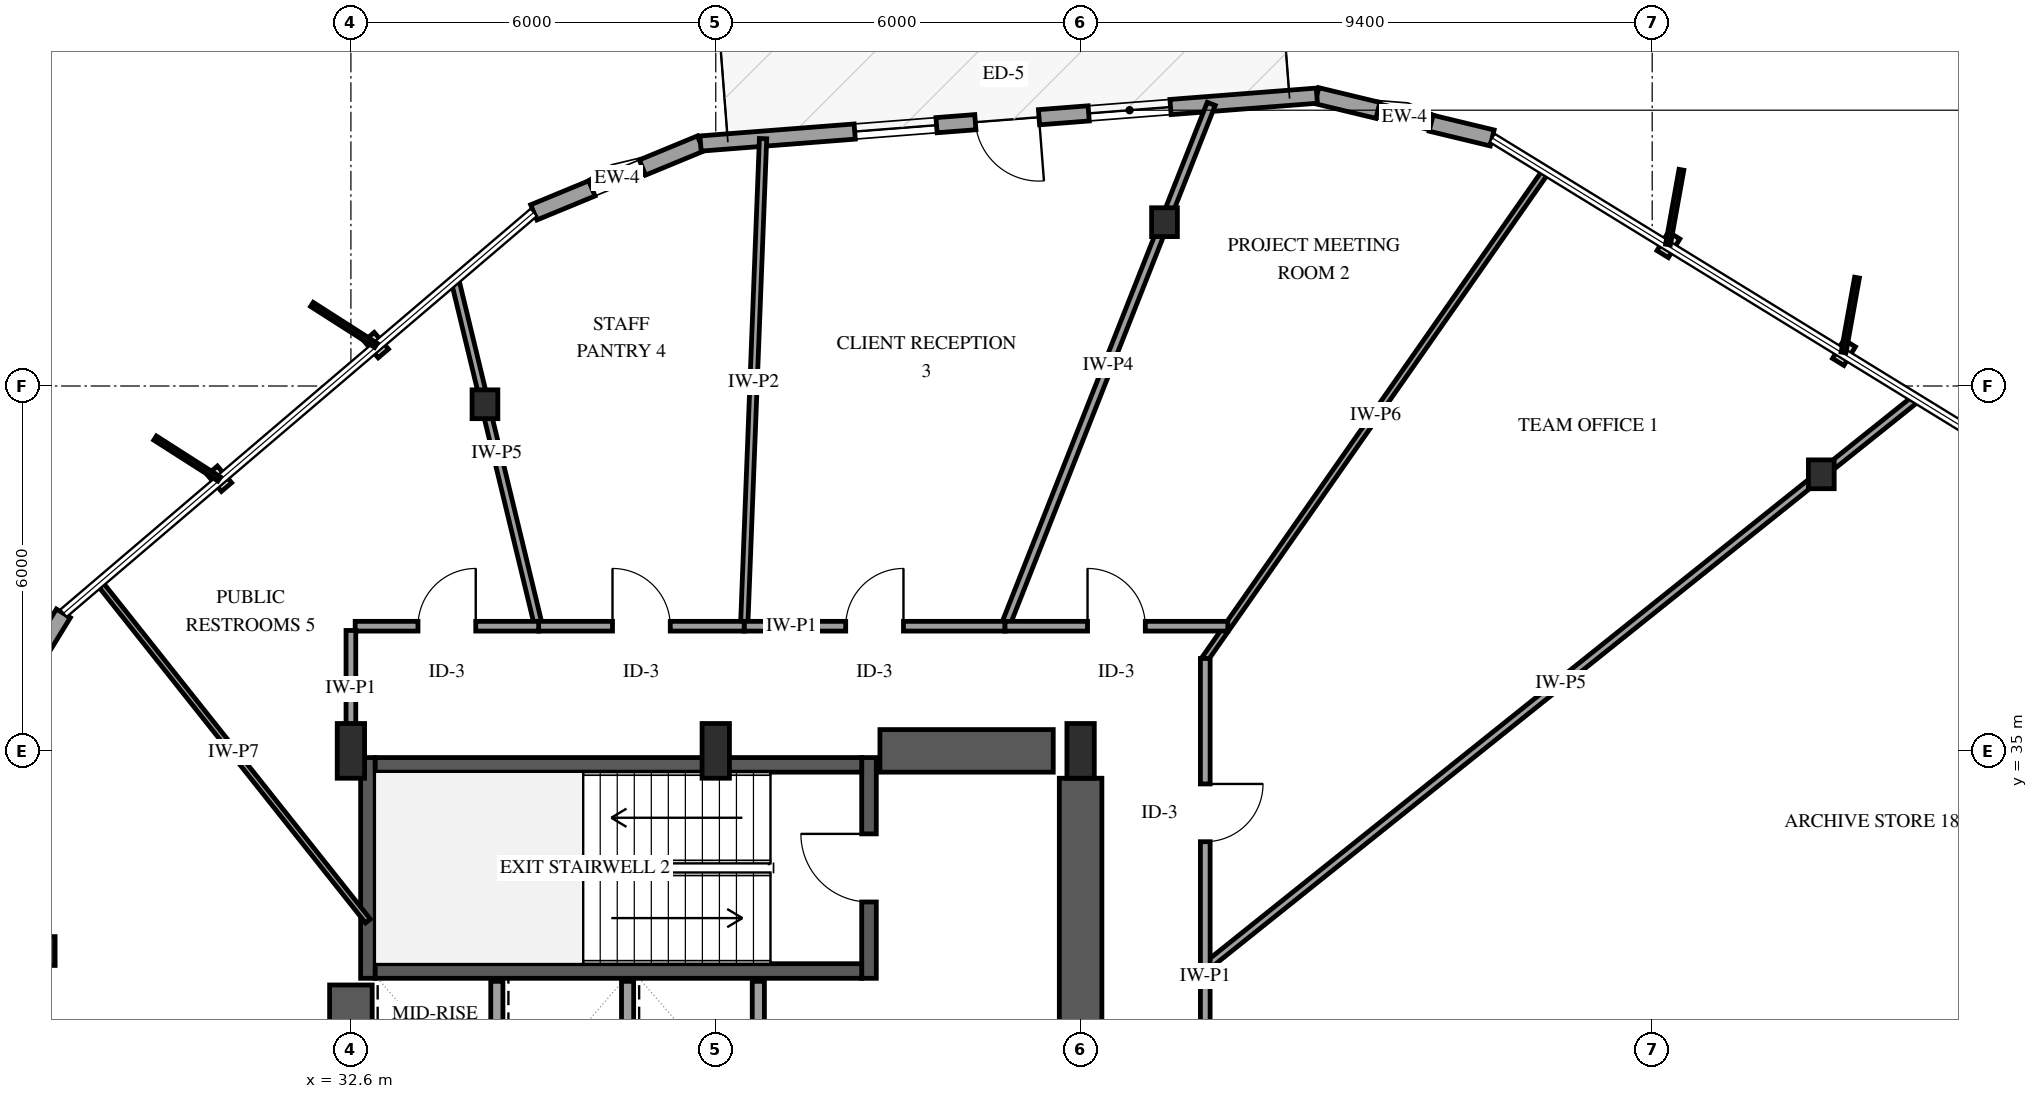
"""IFC4 building model, lengths in metres.
Left out: names, types, materials, properties, quantities, classifications, styles, units other than length and angle.
Written with IfcOpenShell. Run it as: python <this file> out.ifc"""

import sys

from ifc_helpers import new_model, si_unit, direction, frame, frame_2d, origin, origin_2d, place, context, subcontext, project, spatial, rectangle, i_section, extrude, element, fill, save


model = new_model("IFC4")
c1 = context("Model", 3, precision=1e-05, world=origin(), true_north=direction((0.0, 1.0)))
c2 = subcontext(c1, "Body", "Model", "MODEL_VIEW")
j1 = project(units=[si_unit("LENGTHUNIT", "METRE"), si_unit("PLANEANGLEUNIT", "RADIAN")], contexts=[c1])
p1 = place(None, origin())
s1 = spatial("IfcSite", under=j1, at=p1, CompositionType="ELEMENT")
p2 = place(p1, origin())
s2 = spatial("IfcBuilding", under=s1, at=p2, CompositionType="ELEMENT")
p3 = place(p2, frame((0.0, 0.0, 50.6)))
s3 = spatial("IfcBuildingStorey", under=s2, at=p3, CompositionType="ELEMENT", Elevation=50.6)
p4 = place(p3, frame((32.88, 31.26, 0.0), z_axis=(0.0, 0.0, 1.0), x_axis=(0.0, 1.0, 0.0)))
e1 = element("IfcWall", 1, at=p4, inside=s3, PredefinedType="SHEAR", context=c2, shape_type="SweptSolid", body=[
    extrude(rectangle(XDim=3.63, YDim=0.24, at=frame_2d((1.815, 0.0))), origin(), (0.0, 0.0, 1.0), 4.0),
])
p5 = place(p3, frame((41.12, 31.26, 0.0), z_axis=(0.0, 0.0, 1.0), x_axis=(0.0, 1.0, 0.0)))
e2 = element("IfcWall", 2, at=p5, inside=s3, PredefinedType="SHEAR", context=c2, shape_type="SweptSolid", body=[
    extrude(rectangle(XDim=3.63, YDim=0.24, at=frame_2d((1.815, 0.0))), origin(), (0.0, 0.0, 1.0), 4.0),
])
p6 = place(p5, frame((1.255, 0.0, 0.0)))
e3 = element("IfcOpeningElement", 3, at=p6, cuts=e2, PredefinedType="OPENING", context=c2, shape_type="SweptSolid", body=[
    extrude(rectangle(XDim=1.12, YDim=2.15, at=frame_2d((0.56, 1.075))), frame((0.0, 0.13, 0.0), z_axis=(0.0, -1.0, 0.0), x_axis=(1.0, 0.0, 0.0)), (0.0, 0.0, 1.0), 0.26),
])
for number, where, z_axis, x_axis in (
    (4, (33.0, 31.38, 0.0), (0.0, 0.0, 1.0), (1.0, 0.0, 0.0)),
    (5, (33.0, 34.77, 0.0), (0.0, 0.0, 1.0), (1.0, 0.0, 0.0)),
):
    element("IfcWall", number, at=place(p3, frame(where, z_axis=z_axis, x_axis=x_axis)), inside=s3, PredefinedType="SHEAR", context=c2, shape_type="SweptSolid", body=[
        extrude(rectangle(XDim=8.0, YDim=0.24, at=frame_2d((4.0, 0.0))), origin(), (0.0, 0.0, 1.0), 4.0),
    ])
p7 = place(p3, frame((32.6, 18.85, 0.0), z_axis=(0.0, 0.0, 1.0), x_axis=(0.0, 1.0, 0.0)))
e6 = element("IfcWall", 6, at=p7, inside=s3, PredefinedType="SHEAR", context=c2, shape_type="SweptSolid", body=[
    extrude(rectangle(XDim=12.3, YDim=0.7, at=frame_2d((6.15, 0.0))), origin(), (0.0, 0.0, 1.0), 4.0),
])
p8 = place(p3, frame((41.3, 35.0, 0.0), z_axis=(0.0, 0.0, 1.0), x_axis=(1.0, 0.0, 0.0)))
e7 = element("IfcWall", 7, at=p8, inside=s3, PredefinedType="SHEAR", context=c2, shape_type="SweptSolid", body=[
    extrude(rectangle(XDim=2.85, YDim=0.7, at=frame_2d((1.425, 0.0))), origin(), (0.0, 0.0, 1.0), 4.0),
])
p9 = place(p3, frame((44.6, 29.8, 0.0), z_axis=(0.0, 0.0, 1.0), x_axis=(0.0, 1.0, 0.0)))
e8 = element("IfcWall", 8, at=p9, inside=s3, PredefinedType="SHEAR", context=c2, shape_type="SweptSolid", body=[
    extrude(rectangle(XDim=4.75, YDim=0.7, at=frame_2d((2.375, 0.0))), origin(), (0.0, 0.0, 1.0), 4.0),
])
for number, where, z_axis, x_axis in (
    (9, (32.6, 35.0, 0.0), (0.0, 0.0, 1.0), (1.0, 0.0, 0.0)),
    (10, (38.6, 35.0, 0.0), (0.0, 0.0, 1.0), (1.0, 0.0, 0.0)),
    (11, (44.6, 35.0, 0.0), (0.0, 0.0, 1.0), (1.0, 0.0, 0.0)),
):
    element("IfcColumn", number, at=place(p3, frame(where, z_axis=z_axis, x_axis=x_axis)), inside=s3, PredefinedType="PILASTER", context=c2, shape_type="SweptSolid", body=[
        extrude(rectangle(XDim=0.45, YDim=0.9, at=origin_2d()), origin(), (0.0, 0.0, 1.0), 4.0),
    ])
for number, where, z_axis, x_axis in (
    (12, (56.781, 39.548, 0.0), (0.0, 0.0, 1.0), (1.0, 0.0, 0.0)),
    (13, (45.98, 43.694, 0.0), (0.0, 0.0, 1.0), (1.0, 0.0, 0.0)),
    (14, (34.804, 40.7, 0.0), (0.0, 0.0, 1.0), (1.0, 0.0, 0.0)),
    (15, (27.523, 31.708, 0.0), (0.0, 0.0, 1.0), (1.0, 0.0, 0.0)),
):
    element("IfcColumn", number, at=place(p3, frame(where, z_axis=z_axis, x_axis=x_axis)), inside=s3, PredefinedType="COLUMN", context=c2, shape_type="SweptSolid", body=[
        extrude(i_section(OverallWidth=0.424, OverallDepth=0.474, WebThickness=0.048, FlangeThickness=0.077, FilletRadius=0.038, at=origin_2d()), origin(), (0.0, 0.0, 1.0), 4.0),
    ])
p10 = place(p3, frame((51.369, 45.079, 0.0), z_axis=(0.0, 0.0, 1.0), x_axis=(-0.972104212083, 0.234549356962, 0.0)))
e16 = element("IfcWall", 16, at=p10, inside=s3, PredefinedType="SOLIDWALL", context=c2, shape_type="SweptSolid", body=[
    extrude(rectangle(XDim=2.967, YDim=0.27, at=frame_2d((1.483, 0.0))), origin(), (0.0, 0.0, 1.0), 3.079),
])
p11 = place(p10, frame((1.033, 0.0, 0.75)))
e17 = element("IfcOpeningElement", 17, at=p11, cuts=e16, PredefinedType="OPENING", context=c2, shape_type="SweptSolid", body=[
    extrude(rectangle(XDim=0.9, YDim=1.5, at=frame_2d((0.45, 0.75))), frame((0.0, 0.145, 0.0), z_axis=(0.0, -1.0, 0.0), x_axis=(1.0, 0.0, 0.0)), (0.0, 0.0, 1.0), 0.29),
])
p12 = place(p3, frame((38.35, 44.988, 0.0), z_axis=(0.0, 0.0, 1.0), x_axis=(-0.924287306496, -0.381697491544, 0.0)))
e18 = element("IfcWall", 18, at=p12, inside=s3, PredefinedType="SOLIDWALL", context=c2, shape_type="SweptSolid", body=[
    extrude(rectangle(XDim=2.967, YDim=0.27, at=frame_2d((1.483, 0.0))), origin(), (0.0, 0.0, 1.0), 3.079),
])
p13 = place(p12, frame((1.033, 0.0, 0.75)))
e19 = element("IfcOpeningElement", 19, at=p13, cuts=e18, PredefinedType="OPENING", context=c2, shape_type="SweptSolid", body=[
    extrude(rectangle(XDim=0.9, YDim=1.5, at=frame_2d((0.45, 0.75))), frame((0.0, 0.145, 0.0), z_axis=(0.0, -1.0, 0.0), x_axis=(1.0, 0.0, 0.0)), (0.0, 0.0, 1.0), 0.29),
])
p14 = place(p3, frame((48.485, 45.775, 0.0), z_axis=(0.0, 0.0, 1.0), x_axis=(-0.996997704041, -0.07743111866, 0.0)))
e20 = element("IfcWall", 20, at=p14, inside=s3, PredefinedType="SOLIDWALL", context=c2, shape_type="SweptSolid", body=[
    extrude(rectangle(XDim=10.165, YDim=0.25, at=frame_2d((5.083, 0.0))), origin(), (0.0, 0.0, 1.0), 3.079),
])
p15 = place(p14, frame((4.583, 0.0, 0.0)))
e21 = element("IfcOpeningElement", 21, at=p15, cuts=e20, PredefinedType="OPENING", context=c2, shape_type="SweptSolid", body=[
    extrude(rectangle(XDim=1.05, YDim=2.15, at=frame_2d((0.525, 1.075))), frame((0.0, 0.135, 0.0), z_axis=(0.0, -1.0, 0.0), x_axis=(1.0, 0.0, 0.0)), (0.0, 0.0, 1.0), 0.27),
])
p16 = place(p14, frame((2.413, 0.0, 0.72)))
e22 = element("IfcOpeningElement", 22, at=p16, cuts=e20, PredefinedType="OPENING", context=c2, shape_type="SweptSolid", body=[
    extrude(rectangle(XDim=1.35, YDim=1.65, at=frame_2d((0.675, 0.825))), frame((0.0, 0.135, 0.0), z_axis=(0.0, -1.0, 0.0), x_axis=(1.0, 0.0, 0.0)), (0.0, 0.0, 1.0), 0.27),
])
p17 = place(p14, frame((6.273, 0.0, 0.72)))
e23 = element("IfcOpeningElement", 23, at=p17, cuts=e20, PredefinedType="OPENING", context=c2, shape_type="SweptSolid", body=[
    extrude(rectangle(XDim=1.35, YDim=1.65, at=frame_2d((0.675, 0.825))), frame((0.0, 0.135, 0.0), z_axis=(0.0, -1.0, 0.0), x_axis=(1.0, 0.0, 0.0)), (0.0, 0.0, 1.0), 0.27),
])
p18 = place(p3, frame((27.872, 37.262, 0.0), z_axis=(0.0, 0.0, 1.0), x_axis=(-0.523399327402, -0.852087521371, 0.0)))
e24 = element("IfcWall", 24, at=p18, inside=s3, PredefinedType="SOLIDWALL", context=c2, shape_type="SweptSolid", body=[
    extrude(rectangle(XDim=2.967, YDim=0.27, at=frame_2d((1.483, 0.0))), origin(), (0.0, 0.0, 1.0), 3.079),
])
p19 = place(p18, frame((1.033, 0.0, 0.75)))
e25 = element("IfcOpeningElement", 25, at=p19, cuts=e24, PredefinedType="OPENING", context=c2, shape_type="SweptSolid", body=[
    extrude(rectangle(XDim=0.9, YDim=1.5, at=frame_2d((0.45, 0.75))), frame((0.0, 0.145, 0.0), z_axis=(0.0, -1.0, 0.0), x_axis=(1.0, 0.0, 0.0)), (0.0, 0.0, 1.0), 0.29),
])
for number, where, z_axis, x_axis in (
    (26, (35.0, 29.11, 0.0), (0.0, 0.0, 1.0), (0.0, 1.0, 0.0)),
    (27, (37.15, 29.11, 0.0), (0.0, 0.0, 1.0), (0.0, 1.0, 0.0)),
    (28, (39.3, 29.11, 0.0), (0.0, 0.0, 1.0), (0.0, 1.0, 0.0)),
):
    element("IfcWall", number, at=place(p3, frame(where, z_axis=z_axis, x_axis=x_axis)), inside=s3, PredefinedType="SOLIDWALL", context=c2, shape_type="SweptSolid", body=[
        extrude(rectangle(XDim=2.1, YDim=0.2, at=frame_2d((1.05, 0.0))), origin(), (0.0, 0.0, 1.0), 3.7),
    ])
p20 = place(p3, frame((46.65, 31.442, 0.0), z_axis=(0.0, 0.0, 1.0), x_axis=(0.780833810494, 0.624738793728, 0.0)))
e29 = element("IfcWall", 29, at=p20, inside=s3, PredefinedType="PARTITIONING", context=c2, shape_type="SweptSolid", body=[
    extrude(rectangle(XDim=14.973, YDim=0.13, at=frame_2d((7.486, 0.0))), origin(), (0.0, 0.0, 1.0), 3.7),
])
p21 = place(p3, frame((46.65, 36.519, 0.0), z_axis=(0.0, 0.0, 1.0), x_axis=(0.572860774391, 0.819652690574, 0.0)))
e30 = element("IfcWall", 30, at=p21, inside=s3, PredefinedType="PARTITIONING", context=c2, shape_type="SweptSolid", body=[
    extrude(rectangle(XDim=9.781, YDim=0.11, at=frame_2d((4.89, 0.0))), origin(), (0.0, 0.0, 1.0), 3.7),
])
p22 = place(p3, frame((43.357, 37.05, 0.0), z_axis=(0.0, 0.0, 1.0), x_axis=(0.367202648998, 0.930140964891, 0.0)))
e31 = element("IfcWall", 31, at=p22, inside=s3, PredefinedType="PARTITIONING", context=c2, shape_type="SweptSolid", body=[
    extrude(rectangle(XDim=9.235, YDim=0.14, at=frame_2d((4.618, 0.0))), origin(), (0.0, 0.0, 1.0), 2.995),
])
p23 = place(p3, frame((39.067, 37.05, 0.0), z_axis=(0.0, 0.0, 1.0), x_axis=(0.038762636896, 0.999248446574, 0.0)))
e32 = element("IfcWall", 32, at=p23, inside=s3, PredefinedType="PARTITIONING", context=c2, shape_type="SweptSolid", body=[
    extrude(rectangle(XDim=8.024, YDim=0.12, at=frame_2d((4.012, 0.0))), origin(), (0.0, 0.0, 1.0), 3.7),
])
p24 = place(p3, frame((32.88, 32.202, 0.0), z_axis=(0.0, 0.0, 1.0), x_axis=(-0.621908178435, 0.783090172072, 0.0)))
e33 = element("IfcWall", 33, at=p24, inside=s3, PredefinedType="PARTITIONING", context=c2, shape_type="SweptSolid", body=[
    extrude(rectangle(XDim=7.104, YDim=0.1, at=frame_2d((3.552, 0.0))), origin(), (0.0, 0.0, 1.0), 3.7),
])
p25 = place(p3, frame((35.687, 37.05, 0.0), z_axis=(0.0, 0.0, 1.0), x_axis=(-0.235013634281, 0.971992073888, 0.0)))
e34 = element("IfcWall", 34, at=p25, inside=s3, PredefinedType="PARTITIONING", context=c2, shape_type="SweptSolid", body=[
    extrude(rectangle(XDim=5.863, YDim=0.13, at=frame_2d((2.932, 0.0))), origin(), (0.0, 0.0, 1.0), 2.995),
])
p26 = place(p3, frame((46.65, 36.519, 0.0), z_axis=(0.0, 0.0, 1.0), x_axis=(0.0, -1.0, 0.0)))
e35 = element("IfcWall", 35, at=p26, inside=s3, PredefinedType="PARTITIONING", context=c2, shape_type="SweptSolid", body=[
    extrude(rectangle(XDim=5.077, YDim=0.16, at=frame_2d((2.539, 0.0))), origin(), (0.0, 0.0, 1.0), 3.7),
])
p27 = place(p26, frame((2.063, 0.0, 0.0)))
e36 = element("IfcOpeningElement", 36, at=p27, cuts=e35, PredefinedType="OPENING", context=c2, shape_type="SweptSolid", body=[
    extrude(rectangle(XDim=0.95, YDim=2.15, at=frame_2d((0.475, 1.075))), frame((0.0, 0.09, 0.0), z_axis=(0.0, -1.0, 0.0), x_axis=(1.0, 0.0, 0.0)), (0.0, 0.0, 1.0), 0.18),
])
p28 = place(p3, frame((46.65, 31.442, 0.0), z_axis=(0.0, 0.0, 1.0), x_axis=(0.0, -1.0, 0.0)))
e37 = element("IfcWall", 37, at=p28, inside=s3, PredefinedType="PARTITIONING", context=c2, shape_type="SweptSolid", body=[
    extrude(rectangle(XDim=4.849, YDim=0.16, at=frame_2d((2.424, 0.0))), origin(), (0.0, 0.0, 1.0), 3.7),
])
p29 = place(p28, frame((1.95, 0.0, 0.0)))
e38 = element("IfcOpeningElement", 38, at=p29, cuts=e37, PredefinedType="OPENING", context=c2, shape_type="SweptSolid", body=[
    extrude(rectangle(XDim=0.95, YDim=2.15, at=frame_2d((0.475, 1.075))), frame((0.0, 0.09, 0.0), z_axis=(0.0, -1.0, 0.0), x_axis=(1.0, 0.0, 0.0)), (0.0, 0.0, 1.0), 0.18),
])
p30 = place(p3, frame((39.067, 37.05, 0.0), z_axis=(0.0, 0.0, 1.0), x_axis=(1.0, 0.0, 0.0)))
e39 = element("IfcWall", 39, at=p30, inside=s3, PredefinedType="PARTITIONING", context=c2, shape_type="SweptSolid", body=[
    extrude(rectangle(XDim=4.29, YDim=0.16, at=frame_2d((2.145, 0.0))), origin(), (0.0, 0.0, 1.0), 3.7),
])
p31 = place(p30, frame((1.67, 0.0, 0.0)))
e40 = element("IfcOpeningElement", 40, at=p31, cuts=e39, PredefinedType="OPENING", context=c2, shape_type="SweptSolid", body=[
    extrude(rectangle(XDim=0.95, YDim=2.15, at=frame_2d((0.475, 1.075))), frame((0.0, 0.09, 0.0), z_axis=(0.0, -1.0, 0.0), x_axis=(1.0, 0.0, 0.0)), (0.0, 0.0, 1.0), 0.18),
])
p32 = place(p3, frame((43.357, 37.05, 0.0), z_axis=(0.0, 0.0, 1.0), x_axis=(1.0, 0.0, 0.0)))
e41 = element("IfcWall", 41, at=p32, inside=s3, PredefinedType="PARTITIONING", context=c2, shape_type="SweptSolid", body=[
    extrude(rectangle(XDim=3.664, YDim=0.16, at=frame_2d((1.832, 0.0))), origin(), (0.0, 0.0, 1.0), 3.7),
])
p33 = place(p32, frame((1.357, 0.0, 0.0)))
e42 = element("IfcOpeningElement", 42, at=p33, cuts=e41, PredefinedType="OPENING", context=c2, shape_type="SweptSolid", body=[
    extrude(rectangle(XDim=0.95, YDim=2.15, at=frame_2d((0.475, 1.075))), frame((0.0, 0.09, 0.0), z_axis=(0.0, -1.0, 0.0), x_axis=(1.0, 0.0, 0.0)), (0.0, 0.0, 1.0), 0.18),
])
p34 = place(p3, frame((35.687, 37.05, 0.0), z_axis=(0.0, 0.0, 1.0), x_axis=(1.0, 0.0, 0.0)))
e43 = element("IfcWall", 43, at=p34, inside=s3, PredefinedType="PARTITIONING", context=c2, shape_type="SweptSolid", body=[
    extrude(rectangle(XDim=3.38, YDim=0.16, at=frame_2d((1.69, 0.0))), origin(), (0.0, 0.0, 1.0), 3.7),
])
p35 = place(p34, frame((1.215, 0.0, 0.0)))
e44 = element("IfcOpeningElement", 44, at=p35, cuts=e43, PredefinedType="OPENING", context=c2, shape_type="SweptSolid", body=[
    extrude(rectangle(XDim=0.95, YDim=2.15, at=frame_2d((0.475, 1.075))), frame((0.0, 0.09, 0.0), z_axis=(0.0, -1.0, 0.0), x_axis=(1.0, 0.0, 0.0)), (0.0, 0.0, 1.0), 0.18),
])
p36 = place(p3, frame((32.67, 37.05, 0.0), z_axis=(0.0, 0.0, 1.0), x_axis=(1.0, 0.0, 0.0)))
e45 = element("IfcWall", 45, at=p36, inside=s3, PredefinedType="PARTITIONING", context=c2, shape_type="SweptSolid", body=[
    extrude(rectangle(XDim=3.017, YDim=0.16, at=frame_2d((1.509, 0.0))), origin(), (0.0, 0.0, 1.0), 3.7),
])
p37 = place(p36, frame((1.033, 0.0, 0.0)))
e46 = element("IfcOpeningElement", 46, at=p37, cuts=e45, PredefinedType="OPENING", context=c2, shape_type="SweptSolid", body=[
    extrude(rectangle(XDim=0.95, YDim=2.15, at=frame_2d((0.475, 1.075))), frame((0.0, 0.09, 0.0), z_axis=(0.0, -1.0, 0.0), x_axis=(1.0, 0.0, 0.0)), (0.0, 0.0, 1.0), 0.18),
])
p38 = place(p3, frame((32.6, 35.07, 0.0), z_axis=(0.0, 0.0, 1.0), x_axis=(0.0, 1.0, 0.0)))
e47 = element("IfcWall", 47, at=p38, inside=s3, PredefinedType="PARTITIONING", context=c2, shape_type="SweptSolid", body=[
    extrude(rectangle(XDim=1.91, YDim=0.16, at=frame_2d((0.955, 0.0))), origin(), (0.0, 0.0, 1.0), 3.7),
])
p39 = place(p11, origin())
e48 = element("IfcWindow", 48, at=p39, inside=s3, PartitioningType="SINGLE_PANEL", PredefinedType="WINDOW", context=c2, shape_type="SweptSolid", body=[
    extrude(rectangle(XDim=0.9, YDim=1.5, at=frame_2d((0.45, 0.75))), frame((0.0, 0.03, 0.0), z_axis=(0.0, -1.0, 0.0), x_axis=(1.0, 0.0, 0.0)), (0.0, 0.0, 1.0), 0.06),
])
fill(e17, e48)
p40 = place(p13, origin())
e49 = element("IfcWindow", 49, at=p40, inside=s3, PartitioningType="SINGLE_PANEL", PredefinedType="WINDOW", context=c2, shape_type="SweptSolid", body=[
    extrude(rectangle(XDim=0.9, YDim=1.5, at=frame_2d((0.45, 0.75))), frame((0.0, 0.03, 0.0), z_axis=(0.0, -1.0, 0.0), x_axis=(1.0, 0.0, 0.0)), (0.0, 0.0, 1.0), 0.06),
])
fill(e19, e49)
p41 = place(p15, origin())
e50 = element("IfcDoor", 50, at=p41, inside=s3, OperationType="SINGLE_SWING_LEFT", PredefinedType="DOOR", context=c2, shape_type="SweptSolid", body=[
    extrude(rectangle(XDim=1.05, YDim=2.15, at=frame_2d((0.525, 1.075))), frame((0.0, 0.025, 0.0), z_axis=(0.0, -1.0, 0.0), x_axis=(1.0, 0.0, 0.0)), (0.0, 0.0, 1.0), 0.05),
])
fill(e21, e50)
p42 = place(p16, origin())
e51 = element("IfcWindow", 51, at=p42, inside=s3, PartitioningType="SINGLE_PANEL", PredefinedType="WINDOW", context=c2, shape_type="SweptSolid", body=[
    extrude(rectangle(XDim=1.35, YDim=1.65, at=frame_2d((0.675, 0.825))), frame((0.0, 0.03, 0.0), z_axis=(0.0, -1.0, 0.0), x_axis=(1.0, 0.0, 0.0)), (0.0, 0.0, 1.0), 0.06),
])
fill(e22, e51)
p43 = place(p17, origin())
e52 = element("IfcWindow", 52, at=p43, inside=s3, PartitioningType="SINGLE_PANEL", PredefinedType="WINDOW", context=c2, shape_type="SweptSolid", body=[
    extrude(rectangle(XDim=1.35, YDim=1.65, at=frame_2d((0.675, 0.825))), frame((0.0, 0.03, 0.0), z_axis=(0.0, -1.0, 0.0), x_axis=(1.0, 0.0, 0.0)), (0.0, 0.0, 1.0), 0.06),
])
fill(e23, e52)
p44 = place(p6, origin())
e53 = element("IfcDoor", 53, at=p44, inside=s3, OperationType="SINGLE_SWING_RIGHT", PredefinedType="DOOR", context=c2, shape_type="SweptSolid", body=[
    extrude(rectangle(XDim=1.12, YDim=2.15, at=frame_2d((0.56, 1.075))), frame((0.0, 0.025, 0.0), z_axis=(0.0, -1.0, 0.0), x_axis=(1.0, 0.0, 0.0)), (0.0, 0.0, 1.0), 0.05),
])
fill(e3, e53)
p45 = place(p27, origin())
e54 = element("IfcDoor", 54, at=p45, inside=s3, OperationType="SINGLE_SWING_LEFT", PredefinedType="DOOR", context=c2, shape_type="SweptSolid", body=[
    extrude(rectangle(XDim=0.95, YDim=2.15, at=frame_2d((0.475, 1.075))), frame((0.0, 0.025, 0.0), z_axis=(0.0, -1.0, 0.0), x_axis=(1.0, 0.0, 0.0)), (0.0, 0.0, 1.0), 0.05),
])
fill(e36, e54)
p46 = place(p31, origin())
e55 = element("IfcDoor", 55, at=p46, inside=s3, OperationType="SINGLE_SWING_RIGHT", PredefinedType="DOOR", context=c2, shape_type="SweptSolid", body=[
    extrude(rectangle(XDim=0.95, YDim=2.15, at=frame_2d((0.475, 1.075))), frame((0.0, 0.025, 0.0), z_axis=(0.0, -1.0, 0.0), x_axis=(1.0, 0.0, 0.0)), (0.0, 0.0, 1.0), 0.05),
])
fill(e40, e55)
p47 = place(p33, origin())
e56 = element("IfcDoor", 56, at=p47, inside=s3, OperationType="SINGLE_SWING_LEFT", PredefinedType="DOOR", context=c2, shape_type="SweptSolid", body=[
    extrude(rectangle(XDim=0.95, YDim=2.15, at=frame_2d((0.475, 1.075))), frame((0.0, 0.025, 0.0), z_axis=(0.0, -1.0, 0.0), x_axis=(1.0, 0.0, 0.0)), (0.0, 0.0, 1.0), 0.05),
])
fill(e42, e56)
p48 = place(p35, origin())
e57 = element("IfcDoor", 57, at=p48, inside=s3, OperationType="SINGLE_SWING_LEFT", PredefinedType="DOOR", context=c2, shape_type="SweptSolid", body=[
    extrude(rectangle(XDim=0.95, YDim=2.15, at=frame_2d((0.475, 1.075))), frame((0.0, 0.025, 0.0), z_axis=(0.0, -1.0, 0.0), x_axis=(1.0, 0.0, 0.0)), (0.0, 0.0, 1.0), 0.05),
])
fill(e44, e57)
p49 = place(p37, origin())
e58 = element("IfcDoor", 58, at=p49, inside=s3, OperationType="SINGLE_SWING_RIGHT", PredefinedType="DOOR", context=c2, shape_type="SweptSolid", body=[
    extrude(rectangle(XDim=0.95, YDim=2.15, at=frame_2d((0.475, 1.075))), frame((0.0, 0.025, 0.0), z_axis=(0.0, -1.0, 0.0), x_axis=(1.0, 0.0, 0.0)), (0.0, 0.0, 1.0), 0.05),
])
fill(e46, e58)
save(model, sys.argv[1])
